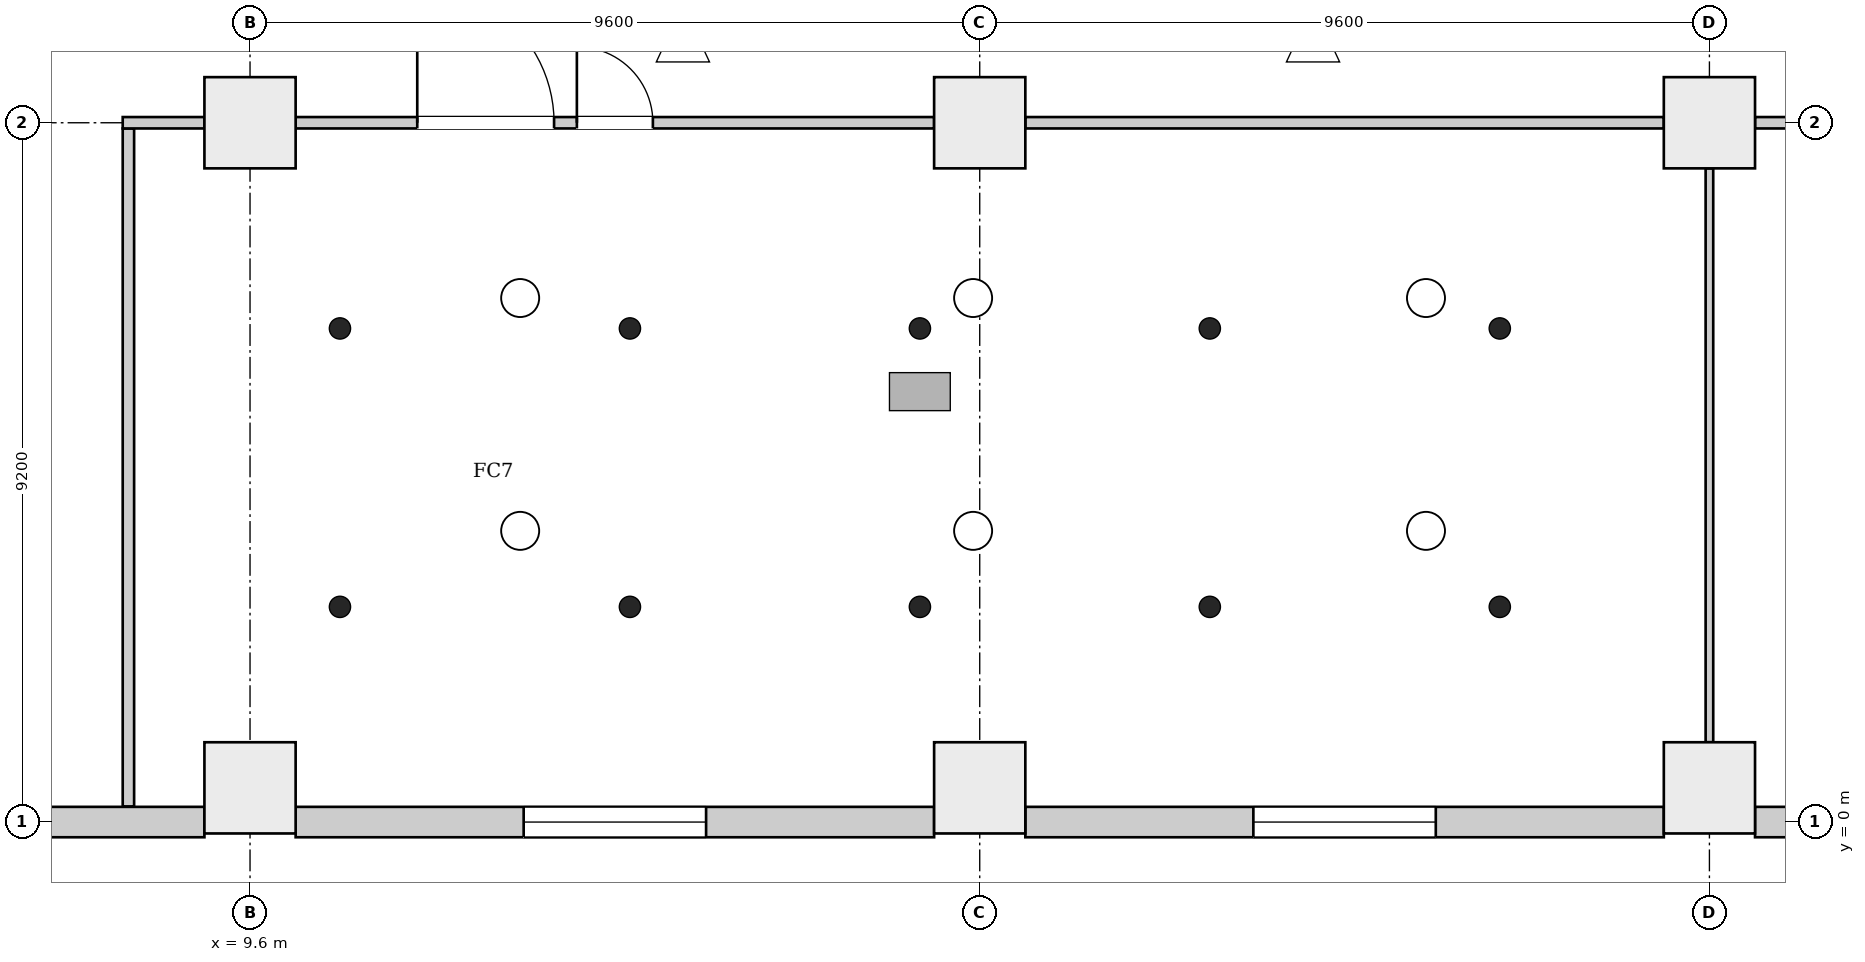
"""IFC4 building model, lengths in metres.
Left out: names, types, materials, properties, quantities, classifications, styles, units other than length and angle.
Written with IfcOpenShell. Run it as: python <this file> out.ifc"""

import sys

from ifc_helpers import new_model, si_unit, direction, frame, frame_2d, origin, origin_2d, place, context, subcontext, project, spatial, rectangle, extrude, element, fill, save


model = new_model("IFC4")
c1 = context("Model", 3, precision=1e-05, world=origin(), true_north=direction((0.0, 1.0)))
c2 = subcontext(c1, "Body", "Model", "MODEL_VIEW")
j1 = project(units=[si_unit("LENGTHUNIT", "METRE"), si_unit("PLANEANGLEUNIT", "RADIAN")], contexts=[c1])
p1 = place(None, origin())
s1 = spatial("IfcSite", under=j1, at=p1, CompositionType="ELEMENT")
p2 = place(p1, origin())
s2 = spatial("IfcBuilding", under=s1, at=p2, CompositionType="ELEMENT")
p3 = place(p2, frame((0.0, 0.0, 21.7)))
s3 = spatial("IfcBuildingStorey", under=s2, at=p3, CompositionType="ELEMENT", Elevation=21.7)
for number, where, z_axis, x_axis in (
    (1, (9.6, 0.45, 0.0), (0.0, 0.0, 1.0), (1.0, 0.0, 0.0)),
    (2, (19.2, 0.45, 0.0), (0.0, 0.0, 1.0), (1.0, 0.0, 0.0)),
    (3, (28.8, 0.45, 0.0), (0.0, 0.0, 1.0), (1.0, 0.0, 0.0)),
    (4, (9.6, 9.2, 0.0), (0.0, 0.0, 1.0), (1.0, 0.0, 0.0)),
    (5, (19.2, 9.2, 0.0), (0.0, 0.0, 1.0), (1.0, 0.0, 0.0)),
    (6, (28.8, 9.2, 0.0), (0.0, 0.0, 1.0), (1.0, 0.0, 0.0)),
):
    element("IfcColumn", number, at=place(p3, frame(where, z_axis=z_axis, x_axis=x_axis)), inside=s3, PredefinedType="COLUMN", context=c2, shape_type="SweptSolid", body=[
        extrude(rectangle(XDim=1.2, YDim=1.2, at=origin_2d()), origin(), (0.0, 0.0, 1.0), 5.0),
    ])
p4 = place(p3, frame((0.2, 0.0, 0.0), z_axis=(0.0, 0.0, 1.0), x_axis=(1.0, 0.0, 0.0)))
e7 = element("IfcWall", 7, at=p4, inside=s3, PredefinedType="ELEMENTEDWALL", context=c2, shape_type="SweptSolid", body=[
    extrude(rectangle(XDim=8.8, YDim=0.4, at=frame_2d((4.4, 0.0))), origin(), (0.0, 0.0, 1.0), 4.65),
])
p5 = place(p4, frame((3.4, 0.0, 1.0)))
e8 = element("IfcOpeningElement", 8, at=p5, cuts=e7, PredefinedType="OPENING", context=c2, shape_type="SweptSolid", body=[
    extrude(rectangle(XDim=2.4, YDim=2.2, at=frame_2d((1.2, 1.1))), frame((0.0, 0.21, 0.0), z_axis=(0.0, -1.0, 0.0), x_axis=(1.0, 0.0, 0.0)), (0.0, 0.0, 1.0), 0.42),
])
p6 = place(p3, frame((10.2, 0.0, 0.0), z_axis=(0.0, 0.0, 1.0), x_axis=(1.0, 0.0, 0.0)))
e9 = element("IfcWall", 9, at=p6, inside=s3, PredefinedType="ELEMENTEDWALL", context=c2, shape_type="SweptSolid", body=[
    extrude(rectangle(XDim=8.4, YDim=0.4, at=frame_2d((4.2, 0.0))), origin(), (0.0, 0.0, 1.0), 4.65),
])
p7 = place(p6, frame((3.0, 0.0, 1.0)))
e10 = element("IfcOpeningElement", 10, at=p7, cuts=e9, PredefinedType="OPENING", context=c2, shape_type="SweptSolid", body=[
    extrude(rectangle(XDim=2.4, YDim=2.2, at=frame_2d((1.2, 1.1))), frame((0.0, 0.21, 0.0), z_axis=(0.0, -1.0, 0.0), x_axis=(1.0, 0.0, 0.0)), (0.0, 0.0, 1.0), 0.42),
])
p8 = place(p3, frame((19.8, 0.0, 0.0), z_axis=(0.0, 0.0, 1.0), x_axis=(1.0, 0.0, 0.0)))
e11 = element("IfcWall", 11, at=p8, inside=s3, PredefinedType="ELEMENTEDWALL", context=c2, shape_type="SweptSolid", body=[
    extrude(rectangle(XDim=8.4, YDim=0.4, at=frame_2d((4.2, 0.0))), origin(), (0.0, 0.0, 1.0), 4.65),
])
p9 = place(p8, frame((3.0, 0.0, 1.0)))
e12 = element("IfcOpeningElement", 12, at=p9, cuts=e11, PredefinedType="OPENING", context=c2, shape_type="SweptSolid", body=[
    extrude(rectangle(XDim=2.4, YDim=2.2, at=frame_2d((1.2, 1.1))), frame((0.0, 0.21, 0.0), z_axis=(0.0, -1.0, 0.0), x_axis=(1.0, 0.0, 0.0)), (0.0, 0.0, 1.0), 0.42),
])
p10 = place(p3, frame((29.4, 0.0, 0.0), z_axis=(0.0, 0.0, 1.0), x_axis=(1.0, 0.0, 0.0)))
e13 = element("IfcWall", 13, at=p10, inside=s3, PredefinedType="ELEMENTEDWALL", context=c2, shape_type="SweptSolid", body=[
    extrude(rectangle(XDim=8.4, YDim=0.4, at=frame_2d((4.2, 0.0))), origin(), (0.0, 0.0, 1.0), 4.65),
])
p11 = place(p10, frame((3.0, 0.0, 1.0)))
e14 = element("IfcOpeningElement", 14, at=p11, cuts=e13, PredefinedType="OPENING", context=c2, shape_type="SweptSolid", body=[
    extrude(rectangle(XDim=2.4, YDim=2.2, at=frame_2d((1.2, 1.1))), frame((0.0, 0.21, 0.0), z_axis=(0.0, -1.0, 0.0), x_axis=(1.0, 0.0, 0.0)), (0.0, 0.0, 1.0), 0.42),
])
p12 = place(p3, frame((8.0, 0.206, 0.0), z_axis=(0.0, 0.0, 1.0), x_axis=(0.0, 1.0, 0.0)))
e15 = element("IfcWall", 15, at=p12, inside=s3, PredefinedType="PARTITIONING", context=c2, shape_type="SweptSolid", body=[
    extrude(rectangle(XDim=8.919, YDim=0.15, at=frame_2d((4.459, 0.0))), origin(), (0.0, 0.0, 1.0), 4.65),
])
p13 = place(p3, frame((7.925, 9.2, 0.0), z_axis=(0.0, 0.0, 1.0), x_axis=(1.0, 0.0, 0.0)))
e16 = element("IfcWall", 16, at=p13, inside=s3, PredefinedType="PARTITIONING", context=c2, shape_type="SweptSolid", body=[
    extrude(rectangle(XDim=1.075, YDim=0.15, at=frame_2d((0.538, 0.0))), origin(), (0.0, 0.0, 1.0), 4.25),
])
p14 = place(p3, frame((10.2, 9.2, 0.0), z_axis=(0.0, 0.0, 1.0), x_axis=(1.0, 0.0, 0.0)))
e17 = element("IfcWall", 17, at=p14, inside=s3, PredefinedType="PARTITIONING", context=c2, shape_type="SweptSolid", body=[
    extrude(rectangle(XDim=8.4, YDim=0.15, at=frame_2d((4.2, 0.0))), origin(), (0.0, 0.0, 1.0), 4.25),
])
p15 = place(p14, frame((3.7, 0.0, 0.0)))
e18 = element("IfcOpeningElement", 18, at=p15, cuts=e17, PredefinedType="OPENING", context=c2, shape_type="SweptSolid", body=[
    extrude(rectangle(XDim=1.0, YDim=2.1, at=frame_2d((0.5, 1.05))), frame((0.0, 0.085, 0.0), z_axis=(0.0, -1.0, 0.0), x_axis=(1.0, 0.0, 0.0)), (0.0, 0.0, 1.0), 0.17),
])
p16 = place(p14, frame((1.6, 0.0, 0.0)))
e19 = element("IfcOpeningElement", 19, at=p16, cuts=e17, PredefinedType="OPENING", context=c2, shape_type="SweptSolid", body=[
    extrude(rectangle(XDim=1.8, YDim=2.1, at=frame_2d((0.9, 1.05))), frame((0.0, 0.085, 0.0), z_axis=(0.0, -1.0, 0.0), x_axis=(1.0, 0.0, 0.0)), (0.0, 0.0, 1.0), 0.17),
])
p17 = place(p3, frame((19.8, 9.2, 0.0), z_axis=(0.0, 0.0, 1.0), x_axis=(1.0, 0.0, 0.0)))
e20 = element("IfcWall", 20, at=p17, inside=s3, PredefinedType="PARTITIONING", context=c2, shape_type="SweptSolid", body=[
    extrude(rectangle(XDim=8.4, YDim=0.15, at=frame_2d((4.2, 0.0))), origin(), (0.0, 0.0, 1.0), 4.25),
])
p18 = place(p3, frame((28.8, 1.05, 0.0), z_axis=(0.0, 0.0, 1.0), x_axis=(0.0, 1.0, 0.0)))
e21 = element("IfcWall", 21, at=p18, inside=s3, PredefinedType="PARTITIONING", context=c2, shape_type="SweptSolid", body=[
    extrude(rectangle(XDim=7.55, YDim=0.1, at=frame_2d((3.775, 0.0))), origin(), (0.0, 0.0, 1.0), 4.25),
])
p19 = place(p3, frame((29.4, 9.2, 0.0), z_axis=(0.0, 0.0, 1.0), x_axis=(1.0, 0.0, 0.0)))
e22 = element("IfcWall", 22, at=p19, inside=s3, PredefinedType="PARTITIONING", context=c2, shape_type="SweptSolid", body=[
    extrude(rectangle(XDim=8.4, YDim=0.15, at=frame_2d((4.2, 0.0))), origin(), (0.0, 0.0, 1.0), 4.25),
])
p20 = place(p19, frame((3.7, 0.0, 0.0)))
e23 = element("IfcOpeningElement", 23, at=p20, cuts=e22, PredefinedType="OPENING", context=c2, shape_type="SweptSolid", body=[
    extrude(rectangle(XDim=1.0, YDim=2.1, at=frame_2d((0.5, 1.05))), frame((0.0, 0.085, 0.0), z_axis=(0.0, -1.0, 0.0), x_axis=(1.0, 0.0, 0.0)), (0.0, 0.0, 1.0), 0.17),
])
p21 = place(p7, origin())
e24 = element("IfcWindow", 24, at=p21, inside=s3, PartitioningType="SINGLE_PANEL", PredefinedType="WINDOW", context=c2, shape_type="SweptSolid", body=[
    extrude(rectangle(XDim=2.4, YDim=2.2, at=frame_2d((1.2, 1.1))), frame((0.0, 0.03, 0.0), z_axis=(0.0, -1.0, 0.0), x_axis=(1.0, 0.0, 0.0)), (0.0, 0.0, 1.0), 0.06),
])
fill(e10, e24)
p22 = place(p9, origin())
e25 = element("IfcWindow", 25, at=p22, inside=s3, PartitioningType="SINGLE_PANEL", PredefinedType="WINDOW", context=c2, shape_type="SweptSolid", body=[
    extrude(rectangle(XDim=2.4, YDim=2.2, at=frame_2d((1.2, 1.1))), frame((0.0, 0.03, 0.0), z_axis=(0.0, -1.0, 0.0), x_axis=(1.0, 0.0, 0.0)), (0.0, 0.0, 1.0), 0.06),
])
fill(e12, e25)
p23 = place(p15, origin())
e26 = element("IfcDoor", 26, at=p23, inside=s3, OperationType="SINGLE_SWING_LEFT", PredefinedType="DOOR", context=c2, shape_type="SweptSolid", body=[
    extrude(rectangle(XDim=1.0, YDim=2.1, at=frame_2d((0.5, 1.05))), frame((0.0, 0.025, 0.0), z_axis=(0.0, -1.0, 0.0), x_axis=(1.0, 0.0, 0.0)), (0.0, 0.0, 1.0), 0.05),
])
fill(e18, e26)
p24 = place(p16, origin())
e27 = element("IfcDoor", 27, at=p24, inside=s3, OperationType="DOUBLE_DOOR_SINGLE_SWING", PredefinedType="DOOR", context=c2, shape_type="SweptSolid", body=[
    extrude(rectangle(XDim=1.8, YDim=2.1, at=frame_2d((0.9, 1.05))), frame((0.0, 0.025, 0.0), z_axis=(0.0, -1.0, 0.0), x_axis=(1.0, 0.0, 0.0)), (0.0, 0.0, 1.0), 0.05),
])
fill(e19, e27)
save(model, sys.argv[1])
